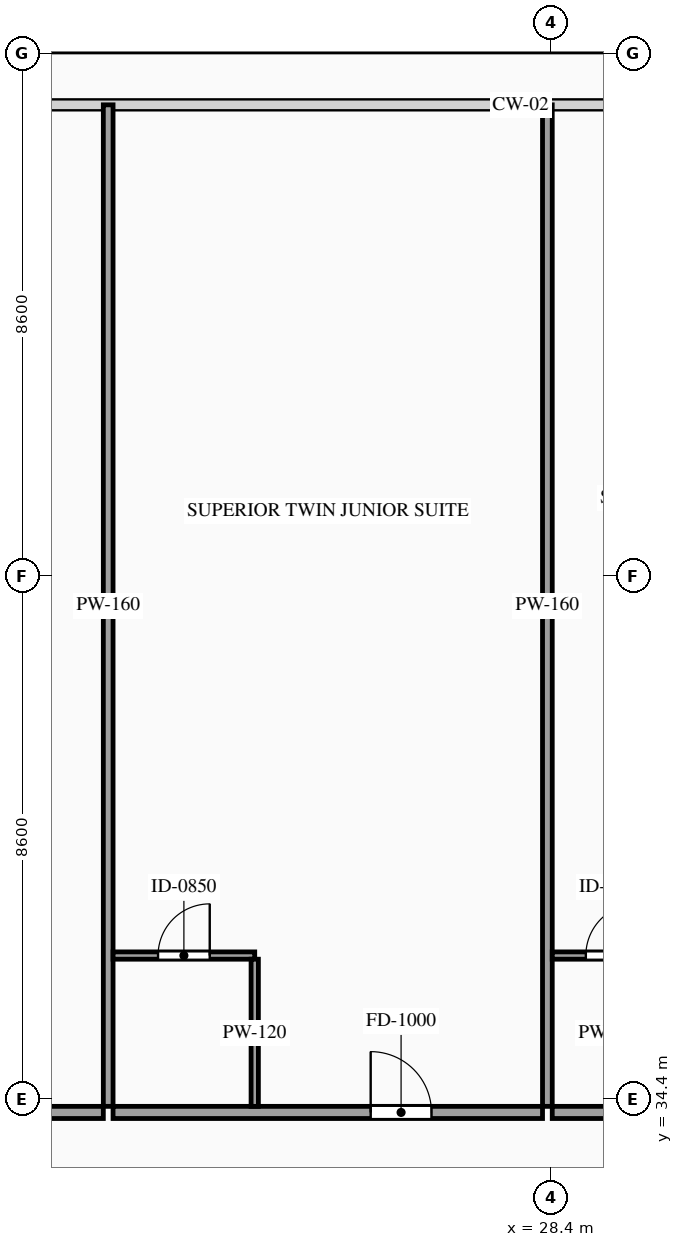
"""IFC4 building model, lengths in metres.
Left out: names, types, materials, properties, quantities, classifications, styles, units other than length and angle.
Written with IfcOpenShell. Run it as: python <this file> out.ifc"""

import sys

from ifc_helpers import new_model, si_unit, direction, frame, frame_2d, origin, place, context, subcontext, project, spatial, rectangle, extrude, source, transform, mapped, element, fill, save


model = new_model("IFC4")
c1 = context("Model", 3, precision=1e-05, world=origin(), true_north=direction((0.0, 1.0)))
c2 = subcontext(c1, "Body", "Model", "MODEL_VIEW")
j1 = project(units=[si_unit("LENGTHUNIT", "METRE"), si_unit("PLANEANGLEUNIT", "RADIAN")], contexts=[c1])
p1 = place(None, origin())
s1 = spatial("IfcSite", under=j1, at=p1, CompositionType="ELEMENT")
p2 = place(p1, origin())
s2 = spatial("IfcBuilding", under=s1, at=p2, CompositionType="ELEMENT")
p3 = place(p2, frame((0.0, 0.0, 49.6)))
s3 = spatial("IfcBuildingStorey", under=s2, at=p3, CompositionType="ELEMENT", Elevation=49.6)
p4 = place(p3, frame((14.94, 34.18, 0.0), z_axis=(0.0, 0.0, 1.0), x_axis=(1.0, 0.0, 0.0)))
e1 = element("IfcWall", 1, at=p4, inside=s3, PredefinedType="PARTITIONING", context=c2, shape_type="SweptSolid", body=[
    extrude(rectangle(XDim=6.097, YDim=0.2, at=frame_2d((3.049, 0.0))), origin(), (0.0, 0.0, 1.0), 3.38),
])
p5 = place(p4, frame((3.754, 0.0, 0.0)))
e2 = element("IfcOpeningElement", 2, at=p5, cuts=e1, PredefinedType="OPENING", context=c2, shape_type="SweptSolid", body=[
    extrude(rectangle(XDim=1.0, YDim=2.2, at=frame_2d((0.5, 1.1))), frame((0.0, 0.115, 0.0), z_axis=(0.0, -1.0, 0.0), x_axis=(1.0, 0.0, 0.0)), (0.0, 0.0, 1.0), 0.23),
])
m1 = source(origin(), c2, "Body", "SweptSolid", [
    extrude(rectangle(XDim=16.47, YDim=0.16, at=frame_2d((8.235, 0.0))), origin(), (0.0, 0.0, 1.0), 3.38),
])
p6 = place(p3, frame((21.117, 34.28, 0.0), z_axis=(0.0, 0.0, 1.0), x_axis=(0.0, 1.0, 0.0)))
e3 = element("IfcWall", 3, at=p6, inside=s3, PredefinedType="PARTITIONING", context=c2, shape_type="MappedRepresentation", body=[
    mapped(m1, transform((0.0, 0.0, 0.0), scale=1.0)),
])
p7 = place(p3, frame((21.197, 34.18, 0.0), z_axis=(0.0, 0.0, 1.0), x_axis=(1.0, 0.0, 0.0)))
e4 = element("IfcWall", 4, at=p7, inside=s3, PredefinedType="PARTITIONING", context=c2, shape_type="SweptSolid", body=[
    extrude(rectangle(XDim=7.063, YDim=0.2, at=frame_2d((3.531, 0.0))), origin(), (0.0, 0.0, 1.0), 3.38),
])
p8 = place(p7, frame((4.237, 0.0, 0.0)))
e5 = element("IfcOpeningElement", 5, at=p8, cuts=e4, PredefinedType="OPENING", context=c2, shape_type="SweptSolid", body=[
    extrude(rectangle(XDim=1.0, YDim=2.2, at=frame_2d((0.5, 1.1))), frame((0.0, 0.115, 0.0), z_axis=(0.0, -1.0, 0.0), x_axis=(1.0, 0.0, 0.0)), (0.0, 0.0, 1.0), 0.23),
])
p9 = place(p3, frame((28.34, 34.28, 0.0), z_axis=(0.0, 0.0, 1.0), x_axis=(0.0, 1.0, 0.0)))
e6 = element("IfcWall", 6, at=p9, inside=s3, PredefinedType="PARTITIONING", context=c2, shape_type="MappedRepresentation", body=[
    mapped(m1, transform((0.0, 0.0, 0.0), scale=1.0)),
])
p10 = place(p3, frame((21.197, 36.76, 0.0), z_axis=(0.0, 0.0, 1.0), x_axis=(1.0, 0.0, 0.0)))
e7 = element("IfcWall", 7, at=p10, inside=s3, PredefinedType="PARTITIONING", context=c2, shape_type="SweptSolid", body=[
    extrude(rectangle(XDim=2.33, YDim=0.12, at=frame_2d((1.165, 0.0))), origin(), (0.0, 0.0, 1.0), 3.38),
])
p11 = place(p10, frame((0.74, 0.0, 0.0)))
e8 = element("IfcOpeningElement", 8, at=p11, cuts=e7, PredefinedType="OPENING", context=c2, shape_type="SweptSolid", body=[
    extrude(rectangle(XDim=0.85, YDim=2.1, at=frame_2d((0.425, 1.05))), frame((0.0, 0.075, 0.0), z_axis=(0.0, -1.0, 0.0), x_axis=(1.0, 0.0, 0.0)), (0.0, 0.0, 1.0), 0.15),
])
m2 = source(origin(), c2, "Body", "SweptSolid", [
    extrude(rectangle(XDim=2.42, YDim=0.12, at=frame_2d((1.21, 0.0))), origin(), (0.0, 0.0, 1.0), 3.38),
])
p12 = place(p3, frame((23.527, 34.28, 0.0), z_axis=(0.0, 0.0, 1.0), x_axis=(0.0, 1.0, 0.0)))
e9 = element("IfcWall", 9, at=p12, inside=s3, PredefinedType="PARTITIONING", context=c2, shape_type="MappedRepresentation", body=[
    mapped(m2, transform((0.0, 0.0, 0.0), scale=1.0)),
])
p13 = place(p3, frame((28.42, 34.18, 0.0), z_axis=(0.0, 0.0, 1.0), x_axis=(1.0, 0.0, 0.0)))
e10 = element("IfcWall", 10, at=p13, inside=s3, PredefinedType="PARTITIONING", context=c2, shape_type="SweptSolid", body=[
    extrude(rectangle(XDim=4.025, YDim=0.2, at=frame_2d((2.013, 0.0))), origin(), (0.0, 0.0, 1.0), 3.38),
])
p14 = place(p13, frame((2.53, 0.0, 0.0)))
e11 = element("IfcOpeningElement", 11, at=p14, cuts=e10, PredefinedType="OPENING", context=c2, shape_type="SweptSolid", body=[
    extrude(rectangle(XDim=1.0, YDim=2.2, at=frame_2d((0.5, 1.1))), frame((0.0, 0.115, 0.0), z_axis=(0.0, -1.0, 0.0), x_axis=(1.0, 0.0, 0.0)), (0.0, 0.0, 1.0), 0.23),
])
p15 = place(p3, frame((28.42, 36.76, 0.0), z_axis=(0.0, 0.0, 1.0), x_axis=(1.0, 0.0, 0.0)))
e12 = element("IfcWall", 12, at=p15, inside=s3, PredefinedType="PARTITIONING", context=c2, shape_type="SweptSolid", body=[
    extrude(rectangle(XDim=1.955, YDim=0.12, at=frame_2d((0.978, 0.0))), origin(), (0.0, 0.0, 1.0), 3.38),
])
p16 = place(p15, frame((0.552, 0.0, 0.0)))
e13 = element("IfcOpeningElement", 13, at=p16, cuts=e12, PredefinedType="OPENING", context=c2, shape_type="SweptSolid", body=[
    extrude(rectangle(XDim=0.85, YDim=2.1, at=frame_2d((0.425, 1.05))), frame((0.0, 0.075, 0.0), z_axis=(0.0, -1.0, 0.0), x_axis=(1.0, 0.0, 0.0)), (0.0, 0.0, 1.0), 0.15),
])
m3 = source(origin(), c2, "Body", "SweptSolid", [
    extrude(rectangle(XDim=1.0, YDim=2.2, at=frame_2d((0.5, 1.1))), frame((0.0, 0.025, 0.0), z_axis=(0.0, -1.0, 0.0), x_axis=(1.0, 0.0, 0.0)), (0.0, 0.0, 1.0), 0.05),
])
p17 = place(p8, origin())
e14 = element("IfcDoor", 14, at=p17, inside=s3, OperationType="SINGLE_SWING_LEFT", PredefinedType="DOOR", context=c2, shape_type="MappedRepresentation", body=[
    mapped(m3, transform((0.0, 0.0, 0.0), scale=1.0)),
])
fill(e5, e14)
m4 = source(origin(), c2, "Body", "SweptSolid", [
    extrude(rectangle(XDim=0.85, YDim=2.1, at=frame_2d((0.425, 1.05))), frame((0.0, 0.025, 0.0), z_axis=(0.0, -1.0, 0.0), x_axis=(1.0, 0.0, 0.0)), (0.0, 0.0, 1.0), 0.05),
])
p18 = place(p11, origin())
e15 = element("IfcDoor", 15, at=p18, inside=s3, OperationType="SINGLE_SWING_RIGHT", PredefinedType="DOOR", context=c2, shape_type="MappedRepresentation", body=[
    mapped(m4, transform((0.0, 0.0, 0.0), scale=1.0)),
])
fill(e8, e15)
p19 = place(p16, origin())
e16 = element("IfcDoor", 16, at=p19, inside=s3, OperationType="SINGLE_SWING_RIGHT", PredefinedType="DOOR", context=c2, shape_type="MappedRepresentation", body=[
    mapped(m4, transform((0.0, 0.0, 0.0), scale=1.0)),
])
fill(e13, e16)
save(model, sys.argv[1])
